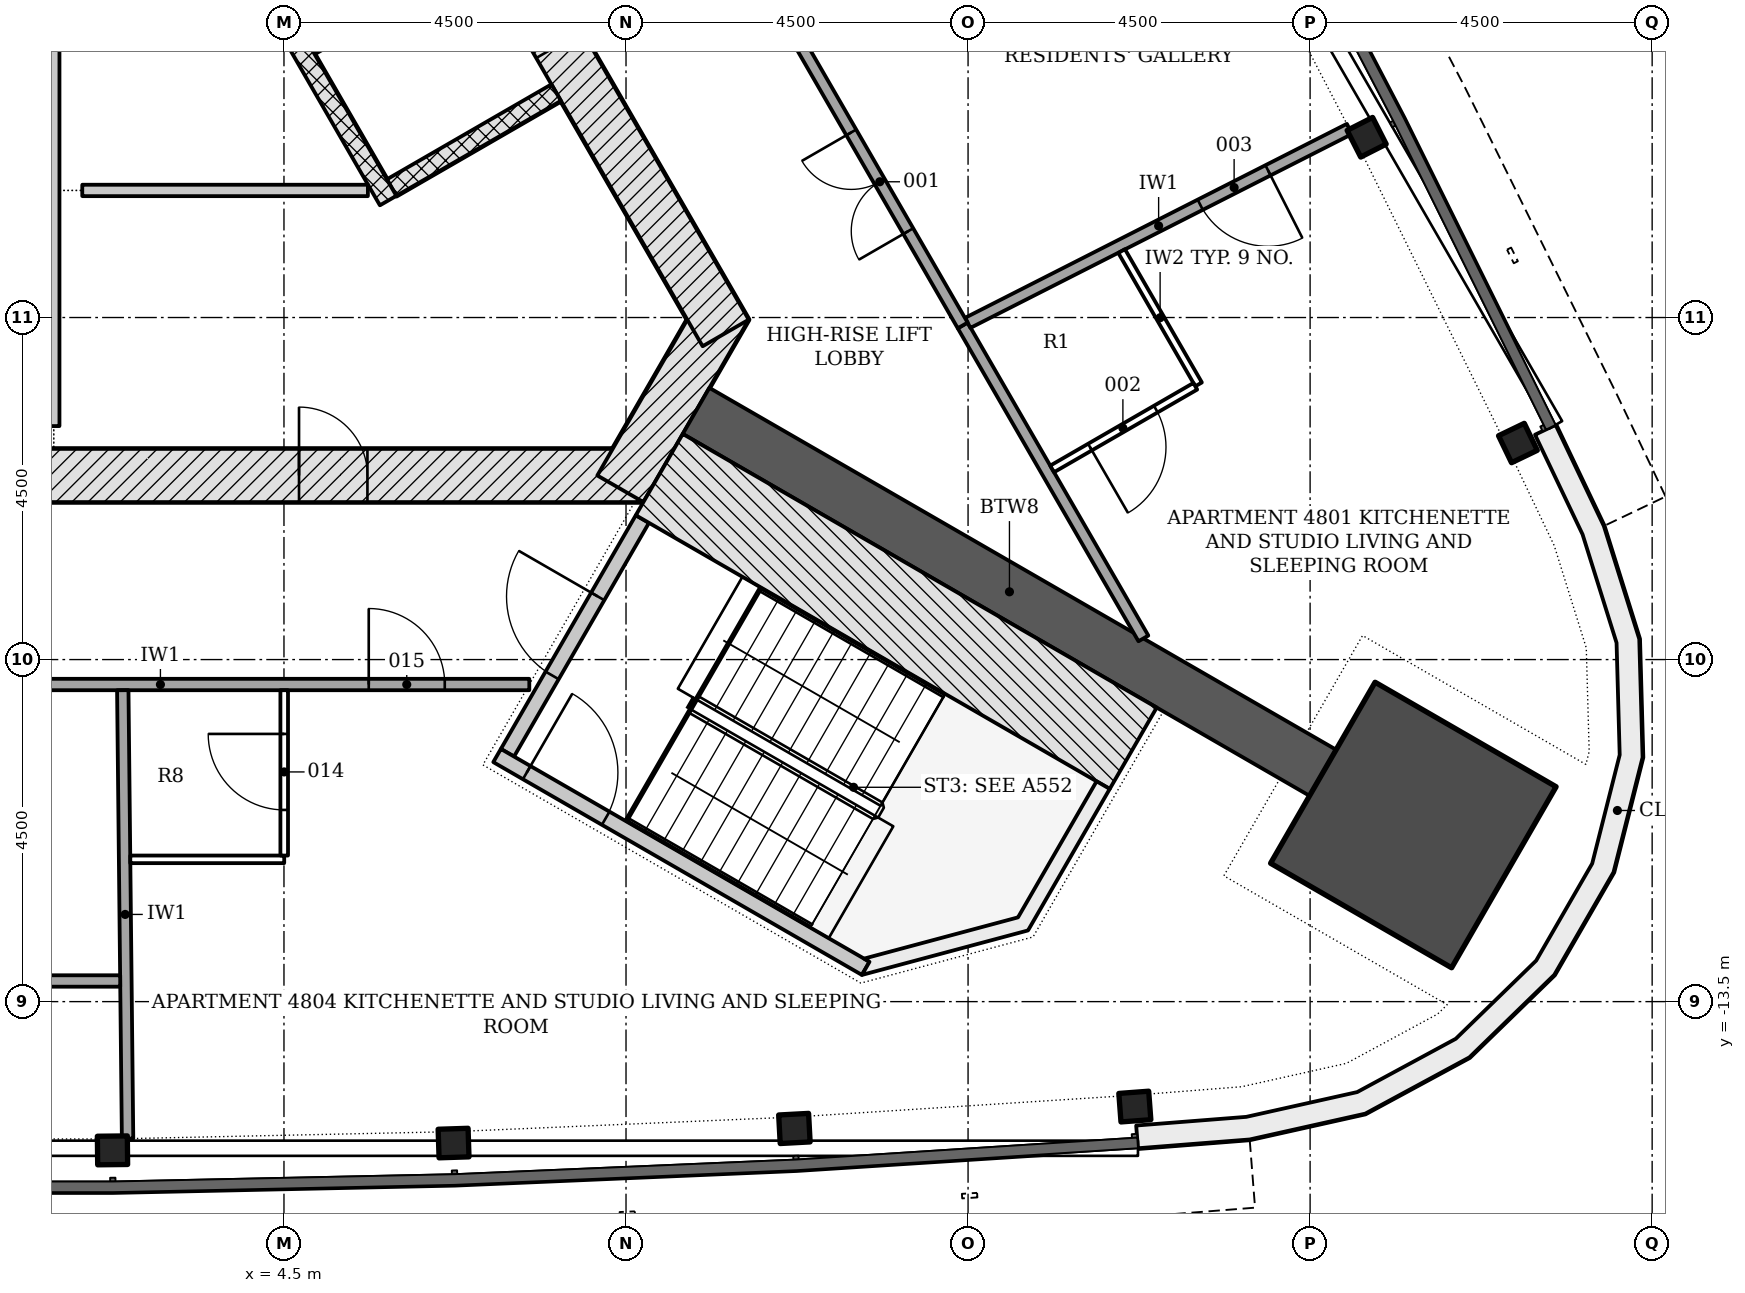
"""IFC4 building model, lengths in metres.
Left out: names, types, materials, properties, quantities, classifications, styles, units other than length and angle.
Written with IfcOpenShell. Run it as: python <this file> out.ifc"""

import sys

from ifc_helpers import new_model, si_unit, direction, frame, frame_2d, origin, origin_2d, place, context, subcontext, project, spatial, polyline, rectangle, i_section, outline, extrude, element, fill, save


model = new_model("IFC4")
c1 = context("Model", 3, precision=1e-05, world=origin(), true_north=direction((0.0, 1.0)))
c2 = subcontext(c1, "Body", "Model", "MODEL_VIEW")
j1 = project(units=[si_unit("LENGTHUNIT", "METRE"), si_unit("PLANEANGLEUNIT", "RADIAN")], contexts=[c1])
p1 = place(None, origin())
s1 = spatial("IfcSite", under=j1, at=p1, CompositionType="ELEMENT")
p2 = place(p1, origin())
s2 = spatial("IfcBuilding", under=s1, at=p2, CompositionType="ELEMENT")
p3 = place(p2, frame((0.0, 0.0, 188.7)))
s3 = spatial("IfcBuildingStorey", under=s2, at=p3, CompositionType="ELEMENT", Elevation=188.7)
p4 = place(p3, frame((-9.229, -6.578, -0.2), z_axis=(0.0, 0.0, 1.0), x_axis=(1.0, 0.0, 0.0)))
e1 = element("IfcWall", 1, at=p4, inside=s3, PredefinedType="SHEAR", context=c2, shape_type="SweptSolid", body=[
    extrude(rectangle(XDim=18.458, YDim=0.7, at=frame_2d((9.229, 0.0))), origin(), (0.0, 0.0, 1.0), 3.6),
])
p5 = place(p4, frame((9.5, 0.0, 0.2)))
e2 = element("IfcOpeningElement", 2, at=p5, cuts=e1, PredefinedType="OPENING", context=c2, shape_type="SweptSolid", body=[
    extrude(rectangle(XDim=1.0, YDim=2.1, at=frame_2d((0.5, 1.05))), frame((0.0, 0.36, 0.0), z_axis=(0.0, -1.0, 0.0), x_axis=(1.0, 0.0, 0.0)), (0.0, 0.0, 1.0), 0.72),
])
p6 = place(p4, frame((4.402, 0.0, 0.2)))
e3 = element("IfcOpeningElement", 3, at=p6, cuts=e1, PredefinedType="OPENING", context=c2, shape_type="SweptSolid", body=[
    extrude(rectangle(XDim=0.9, YDim=2.1, at=frame_2d((0.45, 1.05))), frame((0.0, 0.36, 0.0), z_axis=(0.0, -1.0, 0.0), x_axis=(1.0, 0.0, 0.0)), (0.0, 0.0, 1.0), 0.72),
])
p7 = place(p4, frame((13.927, 0.0, 0.2)))
e4 = element("IfcOpeningElement", 4, at=p7, cuts=e1, PredefinedType="OPENING", context=c2, shape_type="SweptSolid", body=[
    extrude(rectangle(XDim=0.9, YDim=2.1, at=frame_2d((0.45, 1.05))), frame((0.0, 0.36, 0.0), z_axis=(0.0, -1.0, 0.0), x_axis=(1.0, 0.0, 0.0)), (0.0, 0.0, 1.0), 0.72),
])
p8 = place(p3, frame((8.926, -6.753, -0.2), z_axis=(0.0, 0.0, 1.0), x_axis=(0.500042739161, 0.866000726912, 0.0)))
e5 = element("IfcWall", 5, at=p8, inside=s3, PredefinedType="SHEAR", context=c2, shape_type="SweptSolid", body=[
    extrude(rectangle(XDim=2.771, YDim=0.7, at=frame_2d((1.386, 0.0))), origin(), (0.0, 0.0, 1.0), 3.6),
])
p9 = place(p3, frame((10.311, -4.703, -0.2), z_axis=(0.0, 0.0, 1.0), x_axis=(-0.500001446645, 0.866024568562, 0.0)))
e6 = element("IfcWall", 6, at=p9, inside=s3, PredefinedType="SHEAR", context=c2, shape_type="SweptSolid", body=[
    extrude(rectangle(XDim=18.458, YDim=0.7, at=frame_2d((9.229, 0.0))), origin(), (0.0, 0.0, 1.0), 3.6),
])
p10 = place(p9, frame((4.379, 0.0, 0.2)))
e7 = element("IfcOpeningElement", 7, at=p10, cuts=e6, PredefinedType="OPENING", context=c2, shape_type="SweptSolid", body=[
    extrude(rectangle(XDim=1.1, YDim=2.1, at=frame_2d((0.55, 1.05))), frame((0.0, 0.36, 0.0), z_axis=(0.0, -1.0, 0.0), x_axis=(1.0, 0.0, 0.0)), (0.0, 0.0, 1.0), 0.72),
])
p11 = place(p9, frame((6.529, 0.0, 0.2)))
e8 = element("IfcOpeningElement", 8, at=p11, cuts=e6, PredefinedType="OPENING", context=c2, shape_type="SweptSolid", body=[
    extrude(rectangle(XDim=1.1, YDim=2.1, at=frame_2d((0.55, 1.05))), frame((0.0, 0.36, 0.0), z_axis=(0.0, -1.0, 0.0), x_axis=(1.0, 0.0, 0.0)), (0.0, 0.0, 1.0), 0.72),
])
p12 = place(p9, frame((8.679, 0.0, 0.2)))
e9 = element("IfcOpeningElement", 9, at=p12, cuts=e6, PredefinedType="OPENING", context=c2, shape_type="SweptSolid", body=[
    extrude(rectangle(XDim=1.1, YDim=2.1, at=frame_2d((0.55, 1.05))), frame((0.0, 0.36, 0.0), z_axis=(0.0, -1.0, 0.0), x_axis=(1.0, 0.0, 0.0)), (0.0, 0.0, 1.0), 0.72),
])
p13 = place(p9, frame((10.829, 0.0, 0.2)))
e10 = element("IfcOpeningElement", 10, at=p13, cuts=e6, PredefinedType="OPENING", context=c2, shape_type="SweptSolid", body=[
    extrude(rectangle(XDim=1.1, YDim=2.1, at=frame_2d((0.55, 1.05))), frame((0.0, 0.36, 0.0), z_axis=(0.0, -1.0, 0.0), x_axis=(1.0, 0.0, 0.0)), (0.0, 0.0, 1.0), 0.72),
])
p14 = place(p9, frame((12.979, 0.0, 0.2)))
e11 = element("IfcOpeningElement", 11, at=p14, cuts=e6, PredefinedType="OPENING", context=c2, shape_type="SweptSolid", body=[
    extrude(rectangle(XDim=1.1, YDim=2.1, at=frame_2d((0.55, 1.05))), frame((0.0, 0.36, 0.0), z_axis=(0.0, -1.0, 0.0), x_axis=(1.0, 0.0, 0.0)), (0.0, 0.0, 1.0), 0.72),
])
p15 = place(p3, frame((9.922, -5.728, -0.2), z_axis=(0.0, 0.0, 1.0), x_axis=(0.866025463095, -0.499999897272, 0.0)))
e12 = element("IfcWall", 12, at=p15, inside=s3, PredefinedType="SHEAR", context=c2, shape_type="SweptSolid", body=[
    extrude(rectangle(XDim=9.521, YDim=0.7, at=frame_2d((4.761, 0.0))), origin(), (0.0, 0.0, 1.0), 3.6),
])
p16 = place(p3, frame((19.358, -11.177, -0.2), z_axis=(0.0, 0.0, 1.0), x_axis=(0.866025403784, -0.5, 0.0)))
e13 = element("IfcColumn", 13, at=p16, inside=s3, PredefinedType="COLUMN", context=c2, shape_type="SweptSolid", body=[
    extrude(rectangle(XDim=2.75, YDim=2.75, at=origin_2d()), origin(), (0.0, 0.0, 1.0), 3.6),
])
for number, where, z_axis, x_axis in (
    (14, (2.244, -15.457, -0.2), (0.0, 0.0, 1.0), (1.0, 0.011, 0.0)),
    (15, (6.731, -15.361, -0.2), (0.0, 0.0, 1.0), (0.999, 0.032, 0.0)),
    (16, (11.215, -15.169, -0.2), (0.0, 0.0, 1.0), (0.999, 0.053, 0.0)),
    (17, (15.694, -14.881, -0.2), (0.0, 0.0, 1.0), (0.997, 0.075, 0.0)),
    (18, (20.734, -6.151, -0.2), (0.0, 0.0, 1.0), (-0.434, 0.901, 0.0)),
    (19, (18.744, -2.128, -0.2), (0.0, 0.0, 1.0), (-0.453, 0.892, 0.0)),
):
    element("IfcColumn", number, at=place(p3, frame(where, z_axis=z_axis, x_axis=x_axis)), inside=s3, PredefinedType="COLUMN", context=c2, shape_type="SweptSolid", body=[
        extrude(i_section(OverallWidth=0.394, OverallDepth=0.376, WebThickness=0.017, FlangeThickness=0.028, FilletRadius=0.015, at=origin_2d()), origin(), (0.0, 0.0, 1.0), 3.6),
    ])
p17 = place(p3, origin())
e20 = element("IfcWall", 20, at=p17, inside=s3, PredefinedType="NOTDEFINED", context=c2, shape_type="SweptSolid", body=[
    extrude(outline(polyline([(15.735, -15.429), (17.205, -15.313), (18.726, -14.974), (20.096, -14.233), (21.213, -13.147), (21.992, -11.798), (22.374, -10.287), (22.33, -8.73), (21.865, -7.243), (21.229, -5.913), (20.959, -6.042), (21.584, -7.353), (22.032, -8.78), (22.073, -10.254), (21.711, -11.684), (20.974, -12.961), (19.917, -13.989), (18.619, -14.69), (17.16, -15.016), (15.712, -15.13), (15.735, -15.429)])), origin(), (0.0, 0.0, 1.0), 3.3),
])
for number, where, z_axis, x_axis in (
    (21, (8.081, -1.541, -0.2), (0.0, 0.0, 1.0), (-0.866, -0.5, 0.0)),
    (22, (7.006, 0.321, -0.2), (0.0, 0.0, 1.0), (-0.866, -0.5, 0.0)),
):
    element("IfcWall", number, at=place(p3, frame(where, z_axis=z_axis, x_axis=x_axis)), inside=s3, PredefinedType="PARTITIONING", context=c2, shape_type="SweptSolid", body=[
        extrude(rectangle(XDim=2.5, YDim=0.25, at=frame_2d((1.25, 0.0))), origin(), (0.0, 0.0, 1.0), 3.6),
    ])
p18 = place(p3, frame((5.87, -2.961, 0.0), z_axis=(0.0, 0.0, 1.0), x_axis=(-0.50000615651, 0.866021849293, 0.0)))
e23 = element("IfcWall", 23, at=p18, inside=s3, PredefinedType="PARTITIONING", context=c2, shape_type="SweptSolid", body=[
    extrude(rectangle(XDim=11.0, YDim=0.25, at=frame_2d((5.5, 0.0))), origin(), (0.0, 0.0, 1.0), 3.4),
])
p19 = place(p3, frame((1.471, -5.928, 0.0), z_axis=(0.0, 0.0, 1.0), x_axis=(0.0, 1.0, 0.0)))
e24 = element("IfcWall", 24, at=p19, inside=s3, PredefinedType="PARTITIONING", context=c2, shape_type="SweptSolid", body=[
    extrude(rectangle(XDim=10.206, YDim=0.15, at=frame_2d((5.103, 0.0))), origin(), (0.0, 0.0, 1.0), 3.4),
])
p20 = place(p19, frame((6.15, 0.0, 0.0)))
e25 = element("IfcOpeningElement", 25, at=p20, cuts=e24, PredefinedType="OPENING", context=c2, shape_type="SweptSolid", body=[
    extrude(rectangle(XDim=1.0, YDim=2.1, at=frame_2d((0.5, 1.05))), frame((0.0, 0.085, 0.0), z_axis=(0.0, -1.0, 0.0), x_axis=(1.0, 0.0, 0.0)), (0.0, 0.0, 1.0), 0.17),
])
p21 = place(p3, frame((1.846, -2.828, 0.0), z_axis=(0.0, 0.0, 1.0), x_axis=(1.0, 0.0, 0.0)))
e26 = element("IfcWall", 26, at=p21, inside=s3, PredefinedType="PARTITIONING", context=c2, shape_type="SweptSolid", body=[
    extrude(rectangle(XDim=3.758, YDim=0.15, at=frame_2d((1.879, 0.0))), origin(), (0.0, 0.0, 1.0), 3.4),
])
p22 = place(p3, frame((7.44, -10.226, -0.2), z_axis=(0.0, 0.0, 1.0), x_axis=(0.500022077904, 0.866012656725, 0.0)))
e27 = element("IfcWall", 27, at=p22, inside=s3, PredefinedType="SHEAR", context=c2, shape_type="SweptSolid", body=[
    extrude(rectangle(XDim=3.55, YDim=0.2, at=frame_2d((1.775, 0.0))), origin(), (0.0, 0.0, 1.0), 3.6),
])
p23 = place(p22, frame((1.175, 0.0, 0.2)))
e28 = element("IfcOpeningElement", 28, at=p23, cuts=e27, PredefinedType="OPENING", context=c2, shape_type="SweptSolid", body=[
    extrude(rectangle(XDim=1.2, YDim=2.1, at=frame_2d((0.6, 1.05))), frame((0.0, 0.11, 0.0), z_axis=(0.0, -1.0, 0.0), x_axis=(1.0, 0.0, 0.0)), (0.0, 0.0, 1.0), 0.22),
])
p24 = place(p3, frame((7.304, -10.262, -0.2), z_axis=(0.0, 0.0, 1.0), x_axis=(0.866026594901, -0.49999793692, 0.0)))
e29 = element("IfcWall", 29, at=p24, inside=s3, PredefinedType="SHEAR", context=c2, shape_type="SweptSolid", body=[
    extrude(rectangle(XDim=5.6, YDim=0.2, at=frame_2d((2.8, 0.0))), origin(), (0.0, 0.0, 1.0), 3.6),
])
p25 = place(p24, frame((0.45, 0.0, 0.2)))
e30 = element("IfcOpeningElement", 30, at=p25, cuts=e29, PredefinedType="OPENING", context=c2, shape_type="SweptSolid", body=[
    extrude(rectangle(XDim=1.2, YDim=2.1, at=frame_2d((0.6, 1.05))), frame((0.0, 0.11, 0.0), z_axis=(0.0, -1.0, 0.0), x_axis=(1.0, 0.0, 0.0)), (0.0, 0.0, 1.0), 0.22),
])
p26 = place(p3, frame((9.438, -6.566, -0.2), z_axis=(0.0, 0.0, 1.0), x_axis=(0.866026919366, -0.499997374926, 0.0)))
e31 = element("IfcWall", 31, at=p26, inside=s3, PredefinedType="SHEAR", context=c2, shape_type="SweptSolid", body=[
    extrude(rectangle(XDim=7.2, YDim=1.236, at=frame_2d((3.6, 0.0))), origin(), (0.0, 0.0, 1.0), 3.6),
])
p27 = place(p3, frame((0.0, 0.0, -0.2)))
e32 = element("IfcWall", 32, at=p27, inside=s3, PredefinedType="SHEAR", context=c2, shape_type="SweptSolid", body=[
    extrude(outline(polyline([(12.104, -13.149), (14.289, -12.563), (15.364, -10.701), (15.191, -10.601), (14.157, -12.392), (12.132, -12.934), (12.204, -12.976), (12.204, -12.976), (12.204, -12.976), (12.204, -12.976), (12.204, -12.976), (12.204, -12.976), (12.204, -12.976), (12.204, -12.976), (12.204, -12.976), (12.204, -12.976), (12.204, -12.976), (12.204, -12.976), (12.204, -12.976), (12.204, -12.976), (12.204, -12.976), (12.204, -12.976), (12.204, -12.976), (12.104, -13.149)])), origin(), (0.0, 0.0, 1.0), 3.6),
])
p28 = place(p3, frame((15.807, -8.722, 0.0), z_axis=(0.0, 0.0, 1.0), x_axis=(-0.500015802937, 0.866016279763, 0.0)))
e33 = element("IfcWall", 33, at=p28, inside=s3, PredefinedType="PARTITIONING", context=c2, shape_type="SweptSolid", body=[
    extrude(rectangle(XDim=4.755, YDim=0.15, at=frame_2d((2.377, 0.0))), origin(), (0.0, 0.0, 1.0), 2.923),
])
p29 = place(p3, frame((18.518, -2.019, 0.0), z_axis=(0.0, 0.0, 1.0), x_axis=(-0.891548029597, -0.452926164978, 0.0)))
e34 = element("IfcWall", 34, at=p29, inside=s3, PredefinedType="PARTITIONING", context=c2, shape_type="SweptSolid", body=[
    extrude(rectangle(XDim=5.632, YDim=0.15, at=frame_2d((2.816, 0.0))), origin(), (0.0, 0.0, 1.0), 2.461),
])
p30 = place(p29, frame((1.202, 0.0, 0.0)))
e35 = element("IfcOpeningElement", 35, at=p30, cuts=e34, PredefinedType="OPENING", context=c2, shape_type="SweptSolid", body=[
    extrude(rectangle(XDim=1.0, YDim=2.1, at=frame_2d((0.5, 1.05))), frame((0.0, 0.085, 0.0), z_axis=(0.0, -1.0, 0.0), x_axis=(1.0, 0.0, 0.0)), (0.0, 0.0, 1.0), 0.17),
])
p31 = place(p3, frame((13.429, -4.604, 0.0), z_axis=(0.0, 0.0, 1.0), x_axis=(-0.499995208485, 0.866028170149, 0.0)))
e36 = element("IfcWall", 36, at=p31, inside=s3, PredefinedType="PARTITIONING", context=c2, shape_type="SweptSolid", body=[
    extrude(rectangle(XDim=4.365, YDim=0.15, at=frame_2d((2.182, 0.0))), origin(), (0.0, 0.0, 1.0), 2.852),
])
p32 = place(p31, frame((1.432, 0.0, 0.0)))
e37 = element("IfcOpeningElement", 37, at=p32, cuts=e36, PredefinedType="OPENING", context=c2, shape_type="SweptSolid", body=[
    extrude(rectangle(XDim=1.5, YDim=2.1, at=frame_2d((0.75, 1.05))), frame((0.0, 0.085, 0.0), z_axis=(0.0, -1.0, 0.0), x_axis=(1.0, 0.0, 0.0)), (0.0, 0.0, 1.0), 0.17),
])
p33 = place(p3, frame((15.521, -3.626, 0.0), z_axis=(0.0, 0.0, 1.0), x_axis=(0.500042536776, -0.866000843773, 0.0)))
e38 = element("IfcWall", 38, at=p33, inside=s3, PredefinedType="PARTITIONING", context=c2, shape_type="SweptSolid", body=[
    extrude(rectangle(XDim=2.025, YDim=0.1, at=frame_2d((1.012, 0.0))), origin(), (0.0, 0.0, 1.0), 3.4),
])
p34 = place(p3, frame((16.49, -5.405, 0.0), z_axis=(0.0, 0.0, 1.0), x_axis=(-0.866065968399, -0.499929733443, 0.0)))
e39 = element("IfcWall", 39, at=p34, inside=s3, PredefinedType="PARTITIONING", context=c2, shape_type="SweptSolid", body=[
    extrude(rectangle(XDim=2.175, YDim=0.1, at=frame_2d((1.087, 0.0))), origin(), (0.0, 0.0, 1.0), 3.4),
])
p35 = place(p34, frame((0.6, 0.0, 0.0)))
e40 = element("IfcOpeningElement", 40, at=p35, cuts=e39, PredefinedType="OPENING", context=c2, shape_type="SweptSolid", body=[
    extrude(rectangle(XDim=1.0, YDim=2.1, at=frame_2d((0.5, 1.05))), frame((0.0, 0.06, 0.0), z_axis=(0.0, -1.0, 0.0), x_axis=(1.0, 0.0, 0.0)), (0.0, 0.0, 1.0), 0.12),
])
p36 = place(p3, frame((-1.979, -9.328, 0.0), z_axis=(0.0, 0.0, 1.0), x_axis=(1.0, 0.0, 0.0)))
e41 = element("IfcWall", 41, at=p36, inside=s3, PredefinedType="PARTITIONING", context=c2, shape_type="SweptSolid", body=[
    extrude(rectangle(XDim=9.706, YDim=0.15, at=frame_2d((4.853, 0.0))), origin(), (0.0, 0.0, 1.0), 2.852),
])
p37 = place(p36, frame((1.703, 0.0, 0.0)))
e42 = element("IfcOpeningElement", 42, at=p37, cuts=e41, PredefinedType="OPENING", context=c2, shape_type="SweptSolid", body=[
    extrude(rectangle(XDim=1.0, YDim=2.1, at=frame_2d((0.5, 1.05))), frame((0.0, 0.085, 0.0), z_axis=(0.0, -1.0, 0.0), x_axis=(1.0, 0.0, 0.0)), (0.0, 0.0, 1.0), 0.17),
])
p38 = place(p36, frame((7.594, 0.0, 0.0)))
e43 = element("IfcOpeningElement", 43, at=p38, cuts=e41, PredefinedType="OPENING", context=c2, shape_type="SweptSolid", body=[
    extrude(rectangle(XDim=1.0, YDim=2.1, at=frame_2d((0.5, 1.05))), frame((0.0, 0.085, 0.0), z_axis=(0.0, -1.0, 0.0), x_axis=(1.0, 0.0, 0.0)), (0.0, 0.0, 1.0), 0.17),
])
p39 = place(p3, frame((2.442, -15.302, 0.0), z_axis=(0.0, 0.0, 1.0), x_axis=(-0.01067687349, 0.999943000562, 0.0)))
e44 = element("IfcWall", 44, at=p39, inside=s3, PredefinedType="PARTITIONING", context=c2, shape_type="SweptSolid", body=[
    extrude(rectangle(XDim=5.899, YDim=0.15, at=frame_2d((2.95, 0.0))), origin(), (0.0, 0.0, 1.0), 2.461),
])
p40 = place(p3, frame((-5.57, -13.229, 0.0), z_axis=(0.0, 0.0, 1.0), x_axis=(1.0, 0.0, 0.0)))
e45 = element("IfcWall", 45, at=p40, inside=s3, PredefinedType="PARTITIONING", context=c2, shape_type="SweptSolid", body=[
    extrude(rectangle(XDim=7.915, YDim=0.15, at=frame_2d((3.958, 0.0))), origin(), (0.0, 0.0, 1.0), 2.852),
])
p41 = place(p40, frame((0.625, 0.0, 0.0)))
e46 = element("IfcOpeningElement", 46, at=p41, cuts=e45, PredefinedType="OPENING", context=c2, shape_type="SweptSolid", body=[
    extrude(rectangle(XDim=1.0, YDim=2.1, at=frame_2d((0.5, 1.05))), frame((0.0, 0.085, 0.0), z_axis=(0.0, -1.0, 0.0), x_axis=(1.0, 0.0, 0.0)), (0.0, 0.0, 1.0), 0.17),
])
p42 = place(p3, frame((2.478, -11.628, 0.0), z_axis=(0.0, 0.0, 1.0), x_axis=(1.0, 0.0, 0.0)))
e47 = element("IfcWall", 47, at=p42, inside=s3, PredefinedType="PARTITIONING", context=c2, shape_type="SweptSolid", body=[
    extrude(rectangle(XDim=2.025, YDim=0.1, at=frame_2d((1.013, 0.0))), origin(), (0.0, 0.0, 1.0), 2.852),
])
p43 = place(p3, frame((4.503, -11.578, 0.0), z_axis=(0.0, 0.0, 1.0), x_axis=(0.0, 1.0, 0.0)))
e48 = element("IfcWall", 48, at=p43, inside=s3, PredefinedType="PARTITIONING", context=c2, shape_type="SweptSolid", body=[
    extrude(rectangle(XDim=2.175, YDim=0.1, at=frame_2d((1.087, 0.0))), origin(), (0.0, 0.0, 1.0), 2.852),
])
p44 = place(p43, frame((0.6, 0.0, 0.0)))
e49 = element("IfcOpeningElement", 49, at=p44, cuts=e48, PredefinedType="OPENING", context=c2, shape_type="SweptSolid", body=[
    extrude(rectangle(XDim=1.0, YDim=2.1, at=frame_2d((0.5, 1.05))), frame((0.0, 0.06, 0.0), z_axis=(0.0, -1.0, 0.0), x_axis=(1.0, 0.0, 0.0)), (0.0, 0.0, 1.0), 0.12),
])
p45 = place(p7, origin())
e50 = element("IfcDoor", 50, at=p45, inside=s3, OperationType="SINGLE_SWING_LEFT", PredefinedType="DOOR", context=c2, shape_type="SweptSolid", body=[
    extrude(rectangle(XDim=0.9, YDim=2.1, at=frame_2d((0.45, 1.05))), frame((0.0, 0.075, 0.0), z_axis=(0.0, -1.0, 0.0), x_axis=(1.0, 0.0, 0.0)), (0.0, 0.0, 1.0), 0.15),
])
fill(e4, e50)
p46 = place(p23, origin())
e51 = element("IfcDoor", 51, at=p46, inside=s3, OperationType="SINGLE_SWING_RIGHT", PredefinedType="DOOR", context=c2, shape_type="SweptSolid", body=[
    extrude(rectangle(XDim=1.2, YDim=2.1, at=frame_2d((0.6, 1.05))), frame((0.0, 0.025, 0.0), z_axis=(0.0, -1.0, 0.0), x_axis=(1.0, 0.0, 0.0)), (0.0, 0.0, 1.0), 0.05),
])
fill(e28, e51)
p47 = place(p25, origin())
e52 = element("IfcDoor", 52, at=p47, inside=s3, OperationType="SINGLE_SWING_LEFT", PredefinedType="DOOR", context=c2, shape_type="SweptSolid", body=[
    extrude(rectangle(XDim=1.2, YDim=2.1, at=frame_2d((0.6, 1.05))), frame((0.0, 0.025, 0.0), z_axis=(0.0, -1.0, 0.0), x_axis=(1.0, 0.0, 0.0)), (0.0, 0.0, 1.0), 0.05),
])
fill(e30, e52)
p48 = place(p32, origin())
e53 = element("IfcDoor", 53, at=p48, inside=s3, OperationType="DOUBLE_DOOR_SINGLE_SWING", PredefinedType="DOOR", context=c2, shape_type="SweptSolid", body=[
    extrude(rectangle(XDim=1.5, YDim=2.1, at=frame_2d((0.75, 1.05))), frame((0.0, 0.025, 0.0), z_axis=(0.0, -1.0, 0.0), x_axis=(1.0, 0.0, 0.0)), (0.0, 0.0, 1.0), 0.05),
])
fill(e37, e53)
p49 = place(p35, origin())
e54 = element("IfcDoor", 54, at=p49, inside=s3, OperationType="SINGLE_SWING_RIGHT", PredefinedType="DOOR", context=c2, shape_type="SweptSolid", body=[
    extrude(rectangle(XDim=1.0, YDim=2.1, at=frame_2d((0.5, 1.05))), frame((0.0, 0.025, 0.0), z_axis=(0.0, -1.0, 0.0), x_axis=(1.0, 0.0, 0.0)), (0.0, 0.0, 1.0), 0.05),
])
fill(e40, e54)
p50 = place(p30, origin())
e55 = element("IfcDoor", 55, at=p50, inside=s3, OperationType="SINGLE_SWING_LEFT", PredefinedType="DOOR", context=c2, shape_type="SweptSolid", body=[
    extrude(rectangle(XDim=1.0, YDim=2.1, at=frame_2d((0.5, 1.05))), frame((0.0, 0.025, 0.0), z_axis=(0.0, -1.0, 0.0), x_axis=(1.0, 0.0, 0.0)), (0.0, 0.0, 1.0), 0.05),
])
fill(e35, e55)
p51 = place(p44, origin())
e56 = element("IfcDoor", 56, at=p51, inside=s3, OperationType="SINGLE_SWING_RIGHT", PredefinedType="DOOR", context=c2, shape_type="SweptSolid", body=[
    extrude(rectangle(XDim=1.0, YDim=2.1, at=frame_2d((0.5, 1.05))), frame((0.0, 0.025, 0.0), z_axis=(0.0, -1.0, 0.0), x_axis=(1.0, 0.0, 0.0)), (0.0, 0.0, 1.0), 0.05),
])
fill(e49, e56)
p52 = place(p38, origin())
e57 = element("IfcDoor", 57, at=p52, inside=s3, OperationType="SINGLE_SWING_LEFT", PredefinedType="DOOR", context=c2, shape_type="SweptSolid", body=[
    extrude(rectangle(XDim=1.0, YDim=2.1, at=frame_2d((0.5, 1.05))), frame((0.0, 0.025, 0.0), z_axis=(0.0, -1.0, 0.0), x_axis=(1.0, 0.0, 0.0)), (0.0, 0.0, 1.0), 0.05),
])
fill(e43, e57)
save(model, sys.argv[1])
